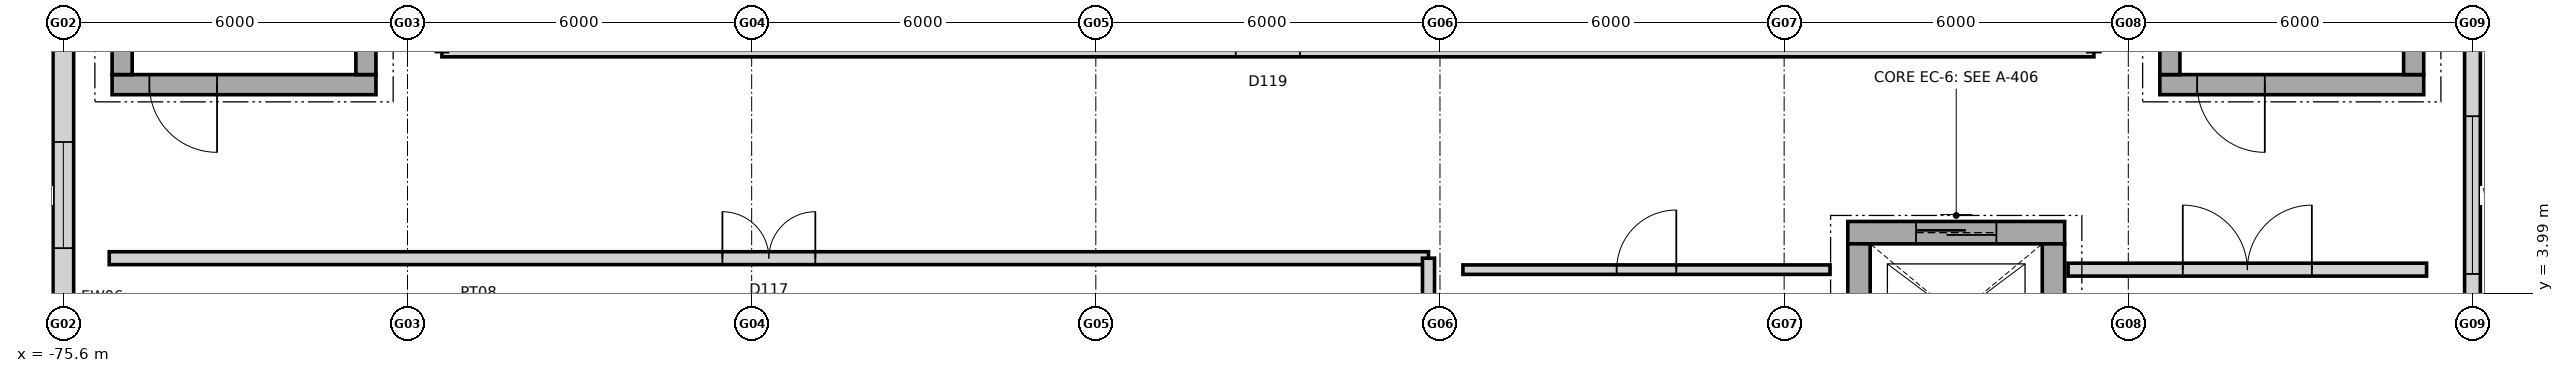
"""IFC4 building model, lengths in metres.
Left out: names, types, materials, properties, quantities, classifications, styles, units other than length and angle.
Written with IfcOpenShell. Run it as: python <this file> out.ifc"""

import sys

from ifc_helpers import new_model, si_unit, direction, frame, frame_2d, origin, place, context, subcontext, project, spatial, rectangle, extrude, element, fill, save


model = new_model("IFC4")
c1 = context("Model", 3, precision=1e-05, world=origin(), true_north=direction((0.0, 1.0)))
c2 = subcontext(c1, "Body", "Model", "MODEL_VIEW")
j1 = project(units=[si_unit("LENGTHUNIT", "METRE"), si_unit("PLANEANGLEUNIT", "RADIAN")], contexts=[c1])
p1 = place(None, origin())
s1 = spatial("IfcSite", under=j1, at=p1, CompositionType="ELEMENT")
p2 = place(p1, origin())
s2 = spatial("IfcBuilding", under=s1, at=p2, CompositionType="ELEMENT")
p3 = place(p2, frame((0.0, 0.0, 10.2)))
s3 = spatial("IfcBuildingStorey", under=s2, at=p3, CompositionType="ELEMENT", Elevation=10.2)
p4 = place(p3, frame((-75.6, 1.648, 0.0), z_axis=(0.0, 0.0, 1.0), x_axis=(0.0, 1.0, 0.0)))
e1 = element("IfcWall", 1, at=p4, inside=s3, PredefinedType="STANDARD", context=c2, shape_type="SweptSolid", body=[
    extrude(rectangle(XDim=8.104, YDim=0.36, at=frame_2d((4.052, 0.0))), origin(), (0.0, 0.0, 1.0), 3.829),
])
p5 = place(p4, frame((3.127, 0.0, 0.85)))
e2 = element("IfcOpeningElement", 2, at=p5, cuts=e1, PredefinedType="OPENING", context=c2, shape_type="SweptSolid", body=[
    extrude(rectangle(XDim=1.85, YDim=1.75, at=frame_2d((0.925, 0.875))), frame((0.0, 0.19, 0.0), z_axis=(0.0, -1.0, 0.0), x_axis=(1.0, 0.0, 0.0)), (0.0, 0.0, 1.0), 0.38),
])
p6 = place(p3, frame((-33.6, 9.752, 0.0), z_axis=(0.0, 0.0, 1.0), x_axis=(0.0, -1.0, 0.0)))
e3 = element("IfcWall", 3, at=p6, inside=s3, PredefinedType="STANDARD", context=c2, shape_type="SweptSolid", body=[
    extrude(rectangle(XDim=8.104, YDim=0.275, at=frame_2d((4.052, 0.0))), origin(), (0.0, 0.0, 1.0), 3.829),
])
p7 = place(p6, frame((2.677, 0.0, 0.85)))
e4 = element("IfcOpeningElement", 4, at=p7, cuts=e3, PredefinedType="OPENING", context=c2, shape_type="SweptSolid", body=[
    extrude(rectangle(XDim=2.75, YDim=1.95, at=frame_2d((1.375, 0.975))), frame((0.0, 0.147, 0.0), z_axis=(0.0, -1.0, 0.0), x_axis=(1.0, 0.0, 0.0)), (0.0, 0.0, 1.0), 0.295),
])
p8 = place(p3, frame((-70.15, 7.625, 0.0), z_axis=(0.0, 0.0, 1.0), x_axis=(-1.0, 0.0, 0.0)))
e5 = element("IfcWall", 5, at=p8, inside=s3, PredefinedType="SHEAR", context=c2, shape_type="SweptSolid", body=[
    extrude(rectangle(XDim=4.6, YDim=0.35, at=frame_2d((2.3, 0.0))), origin(), (0.0, 0.0, 1.0), 4.8),
])
p9 = place(p8, frame((2.77, 0.0, 0.0)))
e6 = element("IfcOpeningElement", 6, at=p9, cuts=e5, PredefinedType="OPENING", context=c2, shape_type="SweptSolid", body=[
    extrude(rectangle(XDim=1.18, YDim=2.15, at=frame_2d((0.59, 1.075))), frame((0.0, 0.185, 0.0), z_axis=(0.0, -1.0, 0.0), x_axis=(1.0, 0.0, 0.0)), (0.0, 0.0, 1.0), 0.37),
])
for number, where, z_axis, x_axis in (
    (7, (-74.575, 7.8, 0.0), (0.0, 0.0, 1.0), (0.0, 1.0, 0.0)),
    (8, (-70.325, 16.1, 0.0), (0.0, 0.0, 1.0), (0.0, -1.0, 0.0)),
):
    element("IfcWall", number, at=place(p3, frame(where, z_axis=z_axis, x_axis=x_axis)), inside=s3, PredefinedType="SHEAR", context=c2, shape_type="SweptSolid", body=[
        extrude(rectangle(XDim=8.3, YDim=0.35, at=frame_2d((4.15, 0.0))), origin(), (0.0, 0.0, 1.0), 4.8),
    ])
p10 = place(p3, frame((-34.45, 7.625, 0.0), z_axis=(0.0, 0.0, 1.0), x_axis=(-1.0, 0.0, 0.0)))
e9 = element("IfcWall", 9, at=p10, inside=s3, PredefinedType="SHEAR", context=c2, shape_type="SweptSolid", body=[
    extrude(rectangle(XDim=4.6, YDim=0.35, at=frame_2d((2.3, 0.0))), origin(), (0.0, 0.0, 1.0), 4.8),
])
p11 = place(p10, frame((2.77, 0.0, 0.0)))
e10 = element("IfcOpeningElement", 10, at=p11, cuts=e9, PredefinedType="OPENING", context=c2, shape_type="SweptSolid", body=[
    extrude(rectangle(XDim=1.18, YDim=2.15, at=frame_2d((0.59, 1.075))), frame((0.0, 0.185, 0.0), z_axis=(0.0, -1.0, 0.0), x_axis=(1.0, 0.0, 0.0)), (0.0, 0.0, 1.0), 0.37),
])
for number, where, z_axis, x_axis in (
    (11, (-38.875, 7.8, 0.0), (0.0, 0.0, 1.0), (0.0, 1.0, 0.0)),
    (12, (-34.625, 16.1, 0.0), (0.0, 0.0, 1.0), (0.0, -1.0, 0.0)),
):
    element("IfcWall", number, at=place(p3, frame(where, z_axis=z_axis, x_axis=x_axis)), inside=s3, PredefinedType="SHEAR", context=c2, shape_type="SweptSolid", body=[
        extrude(rectangle(XDim=8.3, YDim=0.35, at=frame_2d((4.15, 0.0))), origin(), (0.0, 0.0, 1.0), 4.8),
    ])
p12 = place(p3, frame((-44.49, 5.045, 0.0), z_axis=(0.0, 0.0, 1.0), x_axis=(1.0, 0.0, 0.0)))
e13 = element("IfcWall", 13, at=p12, inside=s3, PredefinedType="SHEAR", context=c2, shape_type="SweptSolid", body=[
    extrude(rectangle(XDim=3.78, YDim=0.39, at=frame_2d((1.89, 0.0))), origin(), (0.0, 0.0, 1.0), 4.8),
])
p13 = place(p12, frame((1.19, 0.0, 0.0)))
e14 = element("IfcOpeningElement", 14, at=p13, cuts=e13, PredefinedType="OPENING", context=c2, shape_type="SweptSolid", body=[
    extrude(rectangle(XDim=1.4, YDim=2.2, at=frame_2d((0.7, 1.1))), frame((0.0, 0.205, 0.0), z_axis=(0.0, -1.0, 0.0), x_axis=(1.0, 0.0, 0.0)), (0.0, 0.0, 1.0), 0.41),
])
for number, where, z_axis, x_axis in (
    (15, (-44.295, 2.35, 0.0), (0.0, 0.0, 1.0), (0.0, 1.0, 0.0)),
    (16, (-40.905, 4.85, 0.0), (0.0, 0.0, 1.0), (0.0, -1.0, 0.0)),
):
    element("IfcWall", number, at=place(p3, frame(where, z_axis=z_axis, x_axis=x_axis)), inside=s3, PredefinedType="SHEAR", context=c2, shape_type="SweptSolid", body=[
        extrude(rectangle(XDim=2.5, YDim=0.39, at=frame_2d((1.25, 0.0))), origin(), (0.0, 0.0, 1.0), 4.8),
    ])
p14 = place(p3, frame((-74.8, 4.6, 0.0), z_axis=(0.0, 0.0, 1.0), x_axis=(1.0, 0.0, 0.0)))
e17 = element("IfcWall", 17, at=p14, inside=s3, PredefinedType="PARTITIONING", context=c2, shape_type="SweptSolid", body=[
    extrude(rectangle(XDim=23.0, YDim=0.225, at=frame_2d((11.5, 0.0))), origin(), (0.0, 0.0, 1.0), 4.42),
])
p15 = place(p14, frame((10.69, 0.0, 0.0)))
e18 = element("IfcOpeningElement", 18, at=p15, cuts=e17, PredefinedType="OPENING", context=c2, shape_type="SweptSolid", body=[
    extrude(rectangle(XDim=1.62, YDim=2.2, at=frame_2d((0.81, 1.1))), frame((0.0, 0.123, 0.0), z_axis=(0.0, -1.0, 0.0), x_axis=(1.0, 0.0, 0.0)), (0.0, 0.0, 1.0), 0.245),
])
p16 = place(p3, frame((-51.8, -16.0, 0.0), z_axis=(0.0, 0.0, 1.0), x_axis=(0.0, 1.0, 0.0)))
e19 = element("IfcWall", 19, at=p16, inside=s3, PredefinedType="PARTITIONING", context=c2, shape_type="SweptSolid", body=[
    extrude(rectangle(XDim=20.6, YDim=0.21, at=frame_2d((10.3, 0.0))), origin(), (0.0, 0.0, 1.0), 3.59),
])
p17 = place(p3, frame((-51.2, 4.4, 0.0), z_axis=(0.0, 0.0, 1.0), x_axis=(1.0, 0.0, 0.0)))
e20 = element("IfcWall", 20, at=p17, inside=s3, PredefinedType="PARTITIONING", context=c2, shape_type="SweptSolid", body=[
    extrude(rectangle(XDim=6.4, YDim=0.165, at=frame_2d((3.2, 0.0))), origin(), (0.0, 0.0, 1.0), 4.42),
])
p18 = place(p17, frame((2.68, 0.0, 0.0)))
e21 = element("IfcOpeningElement", 21, at=p18, cuts=e20, PredefinedType="OPENING", context=c2, shape_type="SweptSolid", body=[
    extrude(rectangle(XDim=1.04, YDim=2.2, at=frame_2d((0.52, 1.1))), frame((0.0, 0.093, 0.0), z_axis=(0.0, -1.0, 0.0), x_axis=(1.0, 0.0, 0.0)), (0.0, 0.0, 1.0), 0.185),
])
p19 = place(p3, frame((-69.0, 8.2, 0.0), z_axis=(0.0, 0.0, 1.0), x_axis=(1.0, 0.0, 0.0)))
e22 = element("IfcWall", 22, at=p19, inside=s3, PredefinedType="PARTITIONING", context=c2, shape_type="SweptSolid", body=[
    extrude(rectangle(XDim=28.8, YDim=0.18, at=frame_2d((14.4, 0.0))), origin(), (0.0, 0.0, 1.0), 4.42),
])
p20 = place(p19, frame((13.84, 0.0, 0.0)))
e23 = element("IfcOpeningElement", 23, at=p20, cuts=e22, PredefinedType="OPENING", context=c2, shape_type="SweptSolid", body=[
    extrude(rectangle(XDim=1.12, YDim=2.25, at=frame_2d((0.56, 1.125))), frame((0.0, 0.1, 0.0), z_axis=(0.0, -1.0, 0.0), x_axis=(1.0, 0.0, 0.0)), (0.0, 0.0, 1.0), 0.2),
])
p21 = place(p3, frame((-40.65, 4.4, 0.0), z_axis=(0.0, 0.0, 1.0), x_axis=(1.0, 0.0, 0.0)))
e24 = element("IfcWall", 24, at=p21, inside=s3, PredefinedType="PARTITIONING", context=c2, shape_type="SweptSolid", body=[
    extrude(rectangle(XDim=6.25, YDim=0.225, at=frame_2d((3.125, 0.0))), origin(), (0.0, 0.0, 1.0), 4.42),
])
p22 = place(p21, frame((2.0, 0.0, 0.0)))
e25 = element("IfcOpeningElement", 25, at=p22, cuts=e24, PredefinedType="OPENING", context=c2, shape_type="SweptSolid", body=[
    extrude(rectangle(XDim=2.25, YDim=2.45, at=frame_2d((1.125, 1.225))), frame((0.0, 0.123, 0.0), z_axis=(0.0, -1.0, 0.0), x_axis=(1.0, 0.0, 0.0)), (0.0, 0.0, 1.0), 0.245),
])
p23 = place(p5, origin())
e26 = element("IfcWindow", 26, at=p23, inside=s3, PartitioningType="SINGLE_PANEL", PredefinedType="WINDOW", context=c2, shape_type="SweptSolid", body=[
    extrude(rectangle(XDim=1.85, YDim=1.75, at=frame_2d((0.925, 0.875))), frame((0.0, 0.03, 0.0), z_axis=(0.0, -1.0, 0.0), x_axis=(1.0, 0.0, 0.0)), (0.0, 0.0, 1.0), 0.06),
])
fill(e2, e26)
p24 = place(p7, origin())
e27 = element("IfcWindow", 27, at=p24, inside=s3, PartitioningType="SINGLE_PANEL", PredefinedType="WINDOW", context=c2, shape_type="SweptSolid", body=[
    extrude(rectangle(XDim=2.75, YDim=1.95, at=frame_2d((1.375, 0.975))), frame((0.0, 0.03, 0.0), z_axis=(0.0, -1.0, 0.0), x_axis=(1.0, 0.0, 0.0)), (0.0, 0.0, 1.0), 0.06),
])
fill(e4, e27)
p25 = place(p9, origin())
e28 = element("IfcDoor", 28, at=p25, inside=s3, OperationType="SINGLE_SWING_LEFT", PredefinedType="DOOR", context=c2, shape_type="SweptSolid", body=[
    extrude(rectangle(XDim=1.18, YDim=2.15, at=frame_2d((0.59, 1.075))), frame((0.0, 0.025, 0.0), z_axis=(0.0, -1.0, 0.0), x_axis=(1.0, 0.0, 0.0)), (0.0, 0.0, 1.0), 0.05),
])
fill(e6, e28)
p26 = place(p11, origin())
e29 = element("IfcDoor", 29, at=p26, inside=s3, OperationType="SINGLE_SWING_LEFT", PredefinedType="DOOR", context=c2, shape_type="SweptSolid", body=[
    extrude(rectangle(XDim=1.18, YDim=2.15, at=frame_2d((0.59, 1.075))), frame((0.0, 0.025, 0.0), z_axis=(0.0, -1.0, 0.0), x_axis=(1.0, 0.0, 0.0)), (0.0, 0.0, 1.0), 0.05),
])
fill(e10, e29)
p27 = place(p13, origin())
e30 = element("IfcDoor", 30, at=p27, inside=s3, OperationType="SLIDING_TO_LEFT", PredefinedType="DOOR", context=c2, shape_type="SweptSolid", body=[
    extrude(rectangle(XDim=1.4, YDim=2.2, at=frame_2d((0.7, 1.1))), frame((0.0, 0.025, 0.0), z_axis=(0.0, -1.0, 0.0), x_axis=(1.0, 0.0, 0.0)), (0.0, 0.0, 1.0), 0.05),
])
fill(e14, e30)
p28 = place(p15, origin())
e31 = element("IfcDoor", 31, at=p28, inside=s3, OperationType="DOUBLE_DOOR_SINGLE_SWING", PredefinedType="DOOR", context=c2, shape_type="SweptSolid", body=[
    extrude(rectangle(XDim=1.62, YDim=2.2, at=frame_2d((0.81, 1.1))), frame((0.0, 0.025, 0.0), z_axis=(0.0, -1.0, 0.0), x_axis=(1.0, 0.0, 0.0)), (0.0, 0.0, 1.0), 0.05),
])
fill(e18, e31)
p29 = place(p18, origin())
e32 = element("IfcDoor", 32, at=p29, inside=s3, OperationType="SINGLE_SWING_RIGHT", PredefinedType="DOOR", context=c2, shape_type="SweptSolid", body=[
    extrude(rectangle(XDim=1.04, YDim=2.2, at=frame_2d((0.52, 1.1))), frame((0.0, 0.025, 0.0), z_axis=(0.0, -1.0, 0.0), x_axis=(1.0, 0.0, 0.0)), (0.0, 0.0, 1.0), 0.05),
])
fill(e21, e32)
p30 = place(p20, origin())
e33 = element("IfcDoor", 33, at=p30, inside=s3, OperationType="SINGLE_SWING_LEFT", PredefinedType="DOOR", context=c2, shape_type="SweptSolid", body=[
    extrude(rectangle(XDim=1.12, YDim=2.25, at=frame_2d((0.56, 1.125))), frame((0.0, 0.025, 0.0), z_axis=(0.0, -1.0, 0.0), x_axis=(1.0, 0.0, 0.0)), (0.0, 0.0, 1.0), 0.05),
])
fill(e23, e33)
p31 = place(p22, origin())
e34 = element("IfcDoor", 34, at=p31, inside=s3, OperationType="DOUBLE_DOOR_SINGLE_SWING", PredefinedType="DOOR", context=c2, shape_type="SweptSolid", body=[
    extrude(rectangle(XDim=2.25, YDim=2.45, at=frame_2d((1.125, 1.225))), frame((0.0, 0.025, 0.0), z_axis=(0.0, -1.0, 0.0), x_axis=(1.0, 0.0, 0.0)), (0.0, 0.0, 1.0), 0.05),
])
fill(e25, e34)
save(model, sys.argv[1])
